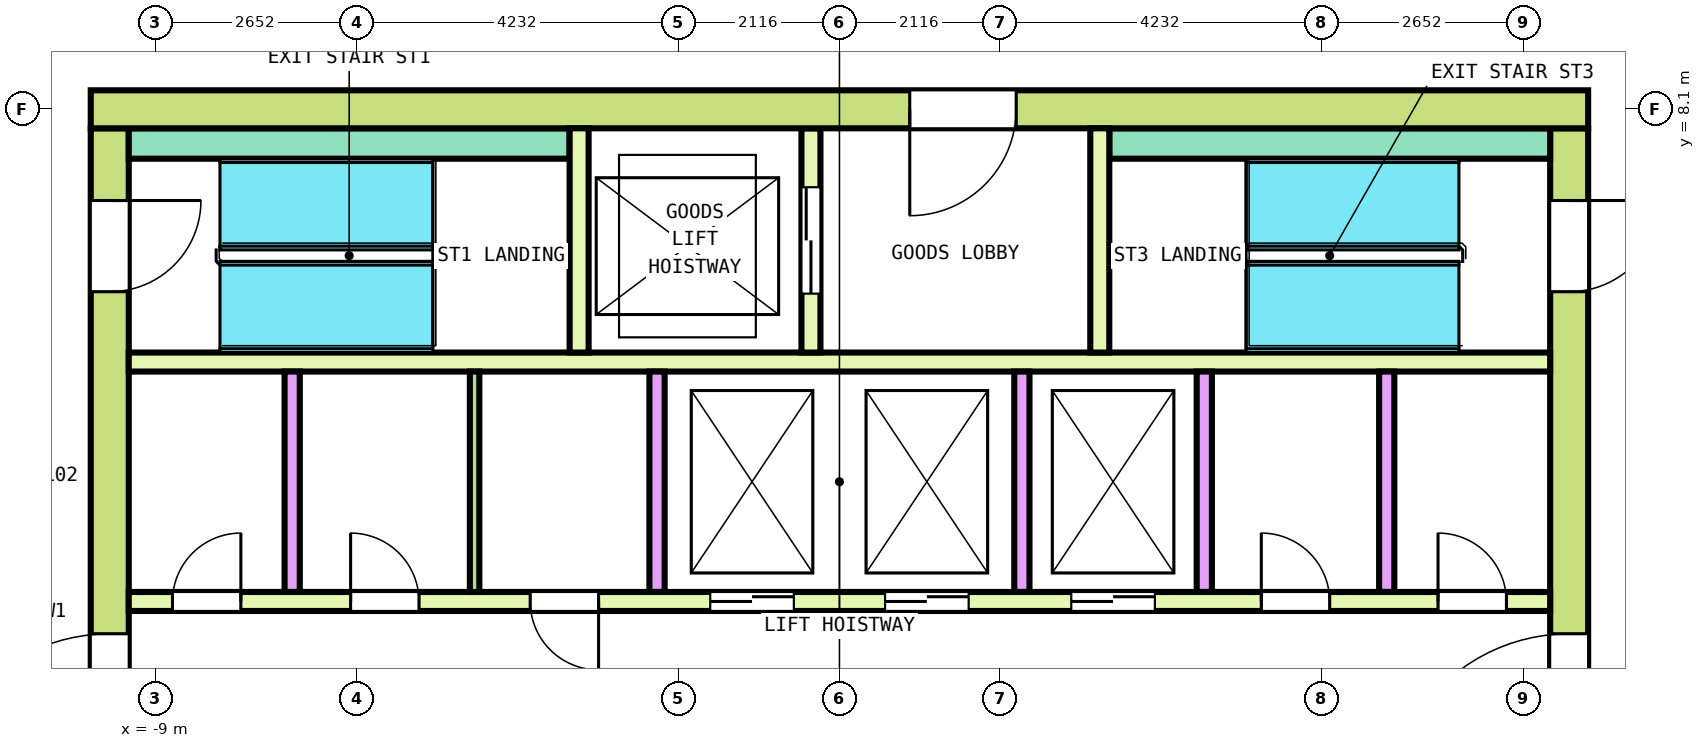
"""IFC4 building model, lengths in metres.
Left out: names, types, materials, properties, quantities, classifications, styles, units other than length and angle.
Written with IfcOpenShell. Run it as: python <this file> out.ifc"""

import sys

from ifc_helpers import new_model, si_unit, direction, frame, frame_2d, origin, place, context, subcontext, project, spatial, rectangle, extrude, element, fill, save


model = new_model("IFC4")
c1 = context("Model", 3, precision=1e-05, world=origin(), true_north=direction((0.0, 1.0)))
c2 = subcontext(c1, "Body", "Model", "MODEL_VIEW")
j1 = project(units=[si_unit("LENGTHUNIT", "METRE"), si_unit("PLANEANGLEUNIT", "RADIAN")], contexts=[c1])
p1 = place(None, origin())
s1 = spatial("IfcSite", under=j1, at=p1, CompositionType="ELEMENT")
p2 = place(p1, origin())
s2 = spatial("IfcBuilding", under=s1, at=p2, CompositionType="ELEMENT")
p3 = place(p2, frame((0.0, 0.0, 263.0)))
s3 = spatial("IfcBuildingStorey", under=s2, at=p3, CompositionType="ELEMENT", Elevation=263.0)
p4 = place(p3, frame((-9.85, 8.1, 0.0), z_axis=(0.0, 0.0, 1.0), x_axis=(1.0, 0.0, 0.0)))
e1 = element("IfcWall", 1, at=p4, inside=s3, PredefinedType="SHEAR", context=c2, shape_type="SweptSolid", body=[
    extrude(rectangle(XDim=19.7, YDim=0.5, at=frame_2d((9.85, 0.0))), origin(), (0.0, 0.0, 1.0), 3.7),
])
p5 = place(p4, frame((10.775, 0.0, 0.0)))
e2 = element("IfcOpeningElement", 2, at=p5, cuts=e1, PredefinedType="OPENING", context=c2, shape_type="SweptSolid", body=[
    extrude(rectangle(XDim=1.4, YDim=2.1, at=frame_2d((0.7, 1.05))), frame((0.0, 0.26, 0.0), z_axis=(0.0, -1.0, 0.0), x_axis=(1.0, 0.0, 0.0)), (0.0, 0.0, 1.0), 0.52),
])
p6 = place(p3, frame((-9.6, -7.85, 0.0), z_axis=(0.0, 0.0, 1.0), x_axis=(0.0, 1.0, 0.0)))
e3 = element("IfcWall", 3, at=p6, inside=s3, PredefinedType="SHEAR", context=c2, shape_type="SweptSolid", body=[
    extrude(rectangle(XDim=15.7, YDim=0.5, at=frame_2d((7.85, 0.0))), origin(), (0.0, 0.0, 1.0), 3.7),
])
p7 = place(p6, frame((6.65, 0.0, 0.0)))
e4 = element("IfcOpeningElement", 4, at=p7, cuts=e3, PredefinedType="OPENING", context=c2, shape_type="SweptSolid", body=[
    extrude(rectangle(XDim=2.4, YDim=2.1, at=frame_2d((1.2, 1.05))), frame((0.0, 0.26, 0.0), z_axis=(0.0, -1.0, 0.0), x_axis=(1.0, 0.0, 0.0)), (0.0, 0.0, 1.0), 0.52),
])
p8 = place(p6, frame((13.55, 0.0, 0.0)))
e5 = element("IfcOpeningElement", 5, at=p8, cuts=e3, PredefinedType="OPENING", context=c2, shape_type="SweptSolid", body=[
    extrude(rectangle(XDim=1.2, YDim=2.1, at=frame_2d((0.6, 1.05))), frame((0.0, 0.26, 0.0), z_axis=(0.0, -1.0, 0.0), x_axis=(1.0, 0.0, 0.0)), (0.0, 0.0, 1.0), 0.52),
])
p9 = place(p6, frame((0.95, 0.0, 0.0)))
e6 = element("IfcOpeningElement", 6, at=p9, cuts=e3, PredefinedType="OPENING", context=c2, shape_type="SweptSolid", body=[
    extrude(rectangle(XDim=1.2, YDim=2.1, at=frame_2d((0.6, 1.05))), frame((0.0, 0.26, 0.0), z_axis=(0.0, -1.0, 0.0), x_axis=(1.0, 0.0, 0.0)), (0.0, 0.0, 1.0), 0.52),
])
p10 = place(p3, frame((9.6, -7.85, 0.0), z_axis=(0.0, 0.0, 1.0), x_axis=(0.0, 1.0, 0.0)))
e7 = element("IfcWall", 7, at=p10, inside=s3, PredefinedType="SHEAR", context=c2, shape_type="SweptSolid", body=[
    extrude(rectangle(XDim=15.7, YDim=0.5, at=frame_2d((7.85, 0.0))), origin(), (0.0, 0.0, 1.0), 3.7),
])
p11 = place(p10, frame((6.65, 0.0, 0.0)))
e8 = element("IfcOpeningElement", 8, at=p11, cuts=e7, PredefinedType="OPENING", context=c2, shape_type="SweptSolid", body=[
    extrude(rectangle(XDim=2.4, YDim=2.1, at=frame_2d((1.2, 1.05))), frame((0.0, 0.26, 0.0), z_axis=(0.0, -1.0, 0.0), x_axis=(1.0, 0.0, 0.0)), (0.0, 0.0, 1.0), 0.52),
])
p12 = place(p10, frame((13.55, 0.0, 0.0)))
e9 = element("IfcOpeningElement", 9, at=p12, cuts=e7, PredefinedType="OPENING", context=c2, shape_type="SweptSolid", body=[
    extrude(rectangle(XDim=1.2, YDim=2.1, at=frame_2d((0.6, 1.05))), frame((0.0, 0.26, 0.0), z_axis=(0.0, -1.0, 0.0), x_axis=(1.0, 0.0, 0.0)), (0.0, 0.0, 1.0), 0.52),
])
p13 = place(p10, frame((1.05, 0.0, 0.0)))
e10 = element("IfcOpeningElement", 10, at=p13, cuts=e7, PredefinedType="OPENING", context=c2, shape_type="SweptSolid", body=[
    extrude(rectangle(XDim=1.0, YDim=2.1, at=frame_2d((0.5, 1.05))), frame((0.0, 0.26, 0.0), z_axis=(0.0, -1.0, 0.0), x_axis=(1.0, 0.0, 0.0)), (0.0, 0.0, 1.0), 0.52),
])
p14 = place(p3, frame((-9.35, 1.625, 0.0), z_axis=(0.0, 0.0, 1.0), x_axis=(1.0, 0.0, 0.0)))
e11 = element("IfcWall", 11, at=p14, inside=s3, PredefinedType="SOLIDWALL", context=c2, shape_type="SweptSolid", body=[
    extrude(rectangle(XDim=18.7, YDim=0.25, at=frame_2d((9.35, 0.0))), origin(), (0.0, 0.0, 1.0), 3.7),
])
p15 = place(p14, frame((7.65, 0.0, 0.0)))
e12 = element("IfcOpeningElement", 12, at=p15, cuts=e11, PredefinedType="OPENING", context=c2, shape_type="SweptSolid", body=[
    extrude(rectangle(XDim=1.1, YDim=2.1, at=frame_2d((0.55, 1.05))), frame((0.0, 0.135, 0.0), z_axis=(0.0, -1.0, 0.0), x_axis=(1.0, 0.0, 0.0)), (0.0, 0.0, 1.0), 0.27),
])
p16 = place(p14, frame((9.95, 0.0, 0.0)))
e13 = element("IfcOpeningElement", 13, at=p16, cuts=e11, PredefinedType="OPENING", context=c2, shape_type="SweptSolid", body=[
    extrude(rectangle(XDim=1.1, YDim=2.1, at=frame_2d((0.55, 1.05))), frame((0.0, 0.135, 0.0), z_axis=(0.0, -1.0, 0.0), x_axis=(1.0, 0.0, 0.0)), (0.0, 0.0, 1.0), 0.27),
])
p17 = place(p14, frame((12.4, 0.0, 0.0)))
e14 = element("IfcOpeningElement", 14, at=p17, cuts=e11, PredefinedType="OPENING", context=c2, shape_type="SweptSolid", body=[
    extrude(rectangle(XDim=1.1, YDim=2.1, at=frame_2d((0.55, 1.05))), frame((0.0, 0.135, 0.0), z_axis=(0.0, -1.0, 0.0), x_axis=(1.0, 0.0, 0.0)), (0.0, 0.0, 1.0), 0.27),
])
p18 = place(p14, frame((0.575, 0.0, 0.0)))
e15 = element("IfcOpeningElement", 15, at=p18, cuts=e11, PredefinedType="OPENING", context=c2, shape_type="SweptSolid", body=[
    extrude(rectangle(XDim=0.9, YDim=2.1, at=frame_2d((0.45, 1.05))), frame((0.0, 0.135, 0.0), z_axis=(0.0, -1.0, 0.0), x_axis=(1.0, 0.0, 0.0)), (0.0, 0.0, 1.0), 0.27),
])
p19 = place(p14, frame((2.919, 0.0, 0.0)))
e16 = element("IfcOpeningElement", 16, at=p19, cuts=e11, PredefinedType="OPENING", context=c2, shape_type="SweptSolid", body=[
    extrude(rectangle(XDim=0.9, YDim=2.1, at=frame_2d((0.45, 1.05))), frame((0.0, 0.135, 0.0), z_axis=(0.0, -1.0, 0.0), x_axis=(1.0, 0.0, 0.0)), (0.0, 0.0, 1.0), 0.27),
])
p20 = place(p14, frame((5.281, 0.0, 0.0)))
e17 = element("IfcOpeningElement", 17, at=p20, cuts=e11, PredefinedType="OPENING", context=c2, shape_type="SweptSolid", body=[
    extrude(rectangle(XDim=0.9, YDim=2.1, at=frame_2d((0.45, 1.05))), frame((0.0, 0.135, 0.0), z_axis=(0.0, -1.0, 0.0), x_axis=(1.0, 0.0, 0.0)), (0.0, 0.0, 1.0), 0.27),
])
p21 = place(p14, frame((14.9, 0.0, 0.0)))
e18 = element("IfcOpeningElement", 18, at=p21, cuts=e11, PredefinedType="OPENING", context=c2, shape_type="SweptSolid", body=[
    extrude(rectangle(XDim=0.9, YDim=2.1, at=frame_2d((0.45, 1.05))), frame((0.0, 0.135, 0.0), z_axis=(0.0, -1.0, 0.0), x_axis=(1.0, 0.0, 0.0)), (0.0, 0.0, 1.0), 0.27),
])
p22 = place(p14, frame((17.225, 0.0, 0.0)))
e19 = element("IfcOpeningElement", 19, at=p22, cuts=e11, PredefinedType="OPENING", context=c2, shape_type="SweptSolid", body=[
    extrude(rectangle(XDim=0.9, YDim=2.1, at=frame_2d((0.45, 1.05))), frame((0.0, 0.135, 0.0), z_axis=(0.0, -1.0, 0.0), x_axis=(1.0, 0.0, 0.0)), (0.0, 0.0, 1.0), 0.27),
])
p23 = place(p3, frame((-9.35, 4.775, 0.0), z_axis=(0.0, 0.0, 1.0), x_axis=(1.0, 0.0, 0.0)))
e20 = element("IfcWall", 20, at=p23, inside=s3, PredefinedType="SOLIDWALL", context=c2, shape_type="SweptSolid", body=[
    extrude(rectangle(XDim=18.7, YDim=0.25, at=frame_2d((9.35, 0.0))), origin(), (0.0, 0.0, 1.0), 3.7),
])
for number, where, z_axis, x_axis in (
    (21, (-7.2, 1.75, 0.0), (0.0, 0.0, 1.0), (0.0, 1.0, 0.0)),
    (22, (-2.4, 1.75, 0.0), (0.0, 0.0, 1.0), (0.0, 1.0, 0.0)),
    (23, (2.4, 1.75, 0.0), (0.0, 0.0, 1.0), (0.0, 1.0, 0.0)),
    (24, (4.8, 1.75, 0.0), (0.0, 0.0, 1.0), (0.0, 1.0, 0.0)),
    (25, (7.2, 1.75, 0.0), (0.0, 0.0, 1.0), (0.0, 1.0, 0.0)),
):
    element("IfcWall", number, at=place(p3, frame(where, z_axis=z_axis, x_axis=x_axis)), inside=s3, PredefinedType="SOLIDWALL", context=c2, shape_type="SweptSolid", body=[
        extrude(rectangle(XDim=2.9, YDim=0.2, at=frame_2d((1.45, 0.0))), origin(), (0.0, 0.0, 1.0), 3.7),
    ])
for number, where, z_axis, x_axis in (
    (26, (-9.35, 7.65, 0.0), (0.0, 0.0, 1.0), (1.0, 0.0, 0.0)),
    (27, (3.55, 7.65, 0.0), (0.0, 0.0, 1.0), (1.0, 0.0, 0.0)),
):
    element("IfcWall", number, at=place(p3, frame(where, z_axis=z_axis, x_axis=x_axis)), inside=s3, PredefinedType="SOLIDWALL", context=c2, shape_type="SweptSolid", body=[
        extrude(rectangle(XDim=5.8, YDim=0.4, at=frame_2d((2.9, 0.0))), origin(), (0.0, 0.0, 1.0), 3.7),
    ])
p24 = place(p3, frame((-3.425, 4.9, 0.0), z_axis=(0.0, 0.0, 1.0), x_axis=(0.0, 1.0, 0.0)))
e28 = element("IfcWall", 28, at=p24, inside=s3, PredefinedType="SOLIDWALL", context=c2, shape_type="SweptSolid", body=[
    extrude(rectangle(XDim=2.95, YDim=0.25, at=frame_2d((1.475, 0.0))), origin(), (0.0, 0.0, 1.0), 3.7),
])
p25 = place(p3, frame((-0.375, 4.9, 0.0), z_axis=(0.0, 0.0, 1.0), x_axis=(0.0, 1.0, 0.0)))
e29 = element("IfcWall", 29, at=p25, inside=s3, PredefinedType="SOLIDWALL", context=c2, shape_type="SweptSolid", body=[
    extrude(rectangle(XDim=2.95, YDim=0.25, at=frame_2d((1.475, 0.0))), origin(), (0.0, 0.0, 1.0), 3.7),
])
p26 = place(p25, frame((0.775, 0.0, 0.0)))
e30 = element("IfcOpeningElement", 30, at=p26, cuts=e29, PredefinedType="OPENING", context=c2, shape_type="SweptSolid", body=[
    extrude(rectangle(XDim=1.4, YDim=2.1, at=frame_2d((0.7, 1.05))), frame((0.0, 0.135, 0.0), z_axis=(0.0, -1.0, 0.0), x_axis=(1.0, 0.0, 0.0)), (0.0, 0.0, 1.0), 0.27),
])
p27 = place(p3, frame((3.425, 4.9, 0.0), z_axis=(0.0, 0.0, 1.0), x_axis=(0.0, 1.0, 0.0)))
e31 = element("IfcWall", 31, at=p27, inside=s3, PredefinedType="SOLIDWALL", context=c2, shape_type="SweptSolid", body=[
    extrude(rectangle(XDim=2.95, YDim=0.25, at=frame_2d((1.475, 0.0))), origin(), (0.0, 0.0, 1.0), 3.7),
])
p28 = place(p3, frame((-4.8, 1.75, 0.0), z_axis=(0.0, 0.0, 1.0), x_axis=(0.0, 1.0, 0.0)))
e32 = element("IfcWall", 32, at=p28, inside=s3, PredefinedType="PARTITIONING", context=c2, shape_type="SweptSolid", body=[
    extrude(rectangle(XDim=2.9, YDim=0.125, at=frame_2d((1.45, 0.0))), origin(), (0.0, 0.0, 1.0), 3.7),
])
p29 = place(p15, origin())
e33 = element("IfcDoor", 33, at=p29, inside=s3, OperationType="DOUBLE_DOOR_SLIDING", PredefinedType="DOOR", context=c2, shape_type="SweptSolid", body=[
    extrude(rectangle(XDim=1.1, YDim=2.1, at=frame_2d((0.55, 1.05))), frame((0.0, 0.075, 0.0), z_axis=(0.0, -1.0, 0.0), x_axis=(1.0, 0.0, 0.0)), (0.0, 0.0, 1.0), 0.15),
])
fill(e12, e33)
p30 = place(p16, origin())
e34 = element("IfcDoor", 34, at=p30, inside=s3, OperationType="DOUBLE_DOOR_SLIDING", PredefinedType="DOOR", context=c2, shape_type="SweptSolid", body=[
    extrude(rectangle(XDim=1.1, YDim=2.1, at=frame_2d((0.55, 1.05))), frame((0.0, 0.075, 0.0), z_axis=(0.0, -1.0, 0.0), x_axis=(1.0, 0.0, 0.0)), (0.0, 0.0, 1.0), 0.15),
])
fill(e13, e34)
p31 = place(p17, origin())
e35 = element("IfcDoor", 35, at=p31, inside=s3, OperationType="DOUBLE_DOOR_SLIDING", PredefinedType="DOOR", context=c2, shape_type="SweptSolid", body=[
    extrude(rectangle(XDim=1.1, YDim=2.1, at=frame_2d((0.55, 1.05))), frame((0.0, 0.075, 0.0), z_axis=(0.0, -1.0, 0.0), x_axis=(1.0, 0.0, 0.0)), (0.0, 0.0, 1.0), 0.15),
])
fill(e14, e35)
p32 = place(p26, origin())
e36 = element("IfcDoor", 36, at=p32, inside=s3, OperationType="DOUBLE_DOOR_SLIDING", PredefinedType="DOOR", context=c2, shape_type="SweptSolid", body=[
    extrude(rectangle(XDim=1.4, YDim=2.1, at=frame_2d((0.7, 1.05))), frame((0.0, 0.075, 0.0), z_axis=(0.0, -1.0, 0.0), x_axis=(1.0, 0.0, 0.0)), (0.0, 0.0, 1.0), 0.15),
])
fill(e30, e36)
p33 = place(p7, origin())
e37 = element("IfcDoor", 37, at=p33, inside=s3, OperationType="DOUBLE_DOOR_SINGLE_SWING", PredefinedType="DOOR", context=c2, shape_type="SweptSolid", body=[
    extrude(rectangle(XDim=2.4, YDim=2.1, at=frame_2d((1.2, 1.05))), frame((0.0, 0.2, 0.0), z_axis=(0.0, -1.0, 0.0), x_axis=(1.0, 0.0, 0.0)), (0.0, 0.0, 1.0), 0.4),
])
fill(e4, e37)
p34 = place(p11, origin())
e38 = element("IfcDoor", 38, at=p34, inside=s3, OperationType="DOUBLE_DOOR_SINGLE_SWING", PredefinedType="DOOR", context=c2, shape_type="SweptSolid", body=[
    extrude(rectangle(XDim=2.4, YDim=2.1, at=frame_2d((1.2, 1.05))), frame((0.0, 0.2, 0.0), z_axis=(0.0, -1.0, 0.0), x_axis=(1.0, 0.0, 0.0)), (0.0, 0.0, 1.0), 0.4),
])
fill(e8, e38)
p35 = place(p8, origin())
e39 = element("IfcDoor", 39, at=p35, inside=s3, OperationType="SINGLE_SWING_RIGHT", PredefinedType="DOOR", context=c2, shape_type="SweptSolid", body=[
    extrude(rectangle(XDim=1.2, YDim=2.1, at=frame_2d((0.6, 1.05))), frame((0.0, 0.2, 0.0), z_axis=(0.0, -1.0, 0.0), x_axis=(1.0, 0.0, 0.0)), (0.0, 0.0, 1.0), 0.4),
])
fill(e5, e39)
p36 = place(p12, origin())
e40 = element("IfcDoor", 40, at=p36, inside=s3, OperationType="SINGLE_SWING_RIGHT", PredefinedType="DOOR", context=c2, shape_type="SweptSolid", body=[
    extrude(rectangle(XDim=1.2, YDim=2.1, at=frame_2d((0.6, 1.05))), frame((0.0, 0.2, 0.0), z_axis=(0.0, -1.0, 0.0), x_axis=(1.0, 0.0, 0.0)), (0.0, 0.0, 1.0), 0.4),
])
fill(e9, e40)
p37 = place(p5, origin())
e41 = element("IfcDoor", 41, at=p37, inside=s3, OperationType="DOUBLE_DOOR_SINGLE_SWING", PredefinedType="DOOR", context=c2, shape_type="SweptSolid", body=[
    extrude(rectangle(XDim=1.4, YDim=2.1, at=frame_2d((0.7, 1.05))), frame((0.0, 0.2, 0.0), z_axis=(0.0, -1.0, 0.0), x_axis=(1.0, 0.0, 0.0)), (0.0, 0.0, 1.0), 0.4),
])
fill(e2, e41)
p38 = place(p18, origin())
e42 = element("IfcDoor", 42, at=p38, inside=s3, OperationType="SINGLE_SWING_RIGHT", PredefinedType="DOOR", context=c2, shape_type="SweptSolid", body=[
    extrude(rectangle(XDim=0.9, YDim=2.1, at=frame_2d((0.45, 1.05))), frame((0.0, 0.075, 0.0), z_axis=(0.0, -1.0, 0.0), x_axis=(1.0, 0.0, 0.0)), (0.0, 0.0, 1.0), 0.15),
])
fill(e15, e42)
p39 = place(p19, origin())
e43 = element("IfcDoor", 43, at=p39, inside=s3, OperationType="SINGLE_SWING_LEFT", PredefinedType="DOOR", context=c2, shape_type="SweptSolid", body=[
    extrude(rectangle(XDim=0.9, YDim=2.1, at=frame_2d((0.45, 1.05))), frame((0.0, 0.075, 0.0), z_axis=(0.0, -1.0, 0.0), x_axis=(1.0, 0.0, 0.0)), (0.0, 0.0, 1.0), 0.15),
])
fill(e16, e43)
p40 = place(p20, origin())
e44 = element("IfcDoor", 44, at=p40, inside=s3, OperationType="SINGLE_SWING_RIGHT", PredefinedType="DOOR", context=c2, shape_type="SweptSolid", body=[
    extrude(rectangle(XDim=0.9, YDim=2.1, at=frame_2d((0.45, 1.05))), frame((0.0, 0.075, 0.0), z_axis=(0.0, -1.0, 0.0), x_axis=(1.0, 0.0, 0.0)), (0.0, 0.0, 1.0), 0.15),
])
fill(e17, e44)
p41 = place(p21, origin())
e45 = element("IfcDoor", 45, at=p41, inside=s3, OperationType="SINGLE_SWING_LEFT", PredefinedType="DOOR", context=c2, shape_type="SweptSolid", body=[
    extrude(rectangle(XDim=0.9, YDim=2.1, at=frame_2d((0.45, 1.05))), frame((0.0, 0.075, 0.0), z_axis=(0.0, -1.0, 0.0), x_axis=(1.0, 0.0, 0.0)), (0.0, 0.0, 1.0), 0.15),
])
fill(e18, e45)
p42 = place(p22, origin())
e46 = element("IfcDoor", 46, at=p42, inside=s3, OperationType="SINGLE_SWING_RIGHT", PredefinedType="DOOR", context=c2, shape_type="SweptSolid", body=[
    extrude(rectangle(XDim=0.9, YDim=2.1, at=frame_2d((0.45, 1.05))), frame((0.0, 0.075, 0.0), z_axis=(0.0, -1.0, 0.0), x_axis=(1.0, 0.0, 0.0)), (0.0, 0.0, 1.0), 0.15),
])
fill(e19, e46)
save(model, sys.argv[1])
